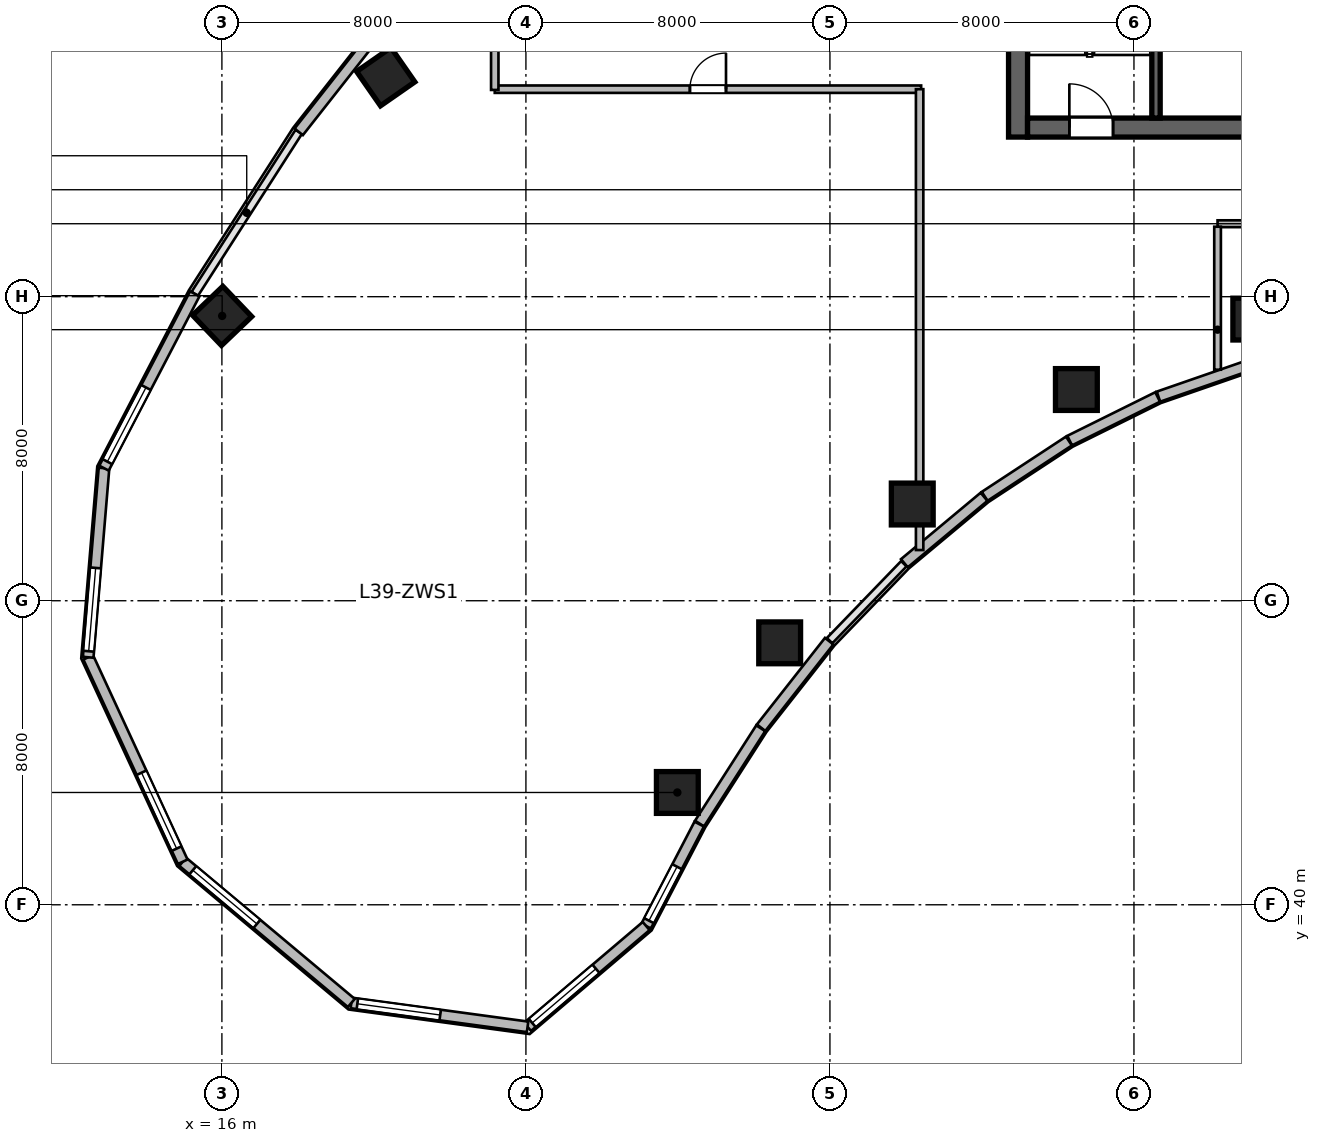
"""IFC4 building model, lengths in metres.
Left out: names, types, materials, properties, quantities, classifications, styles, units other than length and angle.
Written with IfcOpenShell. Run it as: python <this file> out.ifc"""

import sys

from ifc_helpers import new_model, si_unit, direction, frame, frame_2d, origin, origin_2d, place, context, subcontext, project, spatial, rectangle, circle, extrude, source, transform, mapped, element, fill, save


model = new_model("IFC4")
c1 = context("Model", 3, precision=1e-05, world=origin(), true_north=direction((0.0, 1.0)))
c2 = subcontext(c1, "Body", "Model", "MODEL_VIEW")
j1 = project(units=[si_unit("LENGTHUNIT", "METRE"), si_unit("PLANEANGLEUNIT", "RADIAN")], contexts=[c1])
p1 = place(None, origin())
s1 = spatial("IfcSite", under=j1, at=p1, CompositionType="ELEMENT")
p2 = place(p1, origin())
s2 = spatial("IfcBuilding", under=s1, at=p2, CompositionType="ELEMENT")
p3 = place(p2, frame((0.0, 0.0, 162.3)))
s3 = spatial("IfcBuildingStorey", under=s2, at=p3, CompositionType="ELEMENT", Elevation=162.3)
m1 = source(origin(), c2, "Body", "SweptSolid", [
    extrude(rectangle(XDim=12.0, YDim=0.5, at=frame_2d((6.0, 0.0))), origin(), (0.0, 0.0, 1.0), 3.9),
])
p4 = place(p3, frame((36.95, 60.2, 0.0), z_axis=(0.0, 0.0, 1.0), x_axis=(0.0, 1.0, 0.0)))
e1 = element("IfcWall", 1, at=p4, inside=s3, PredefinedType="SHEAR", context=c2, shape_type="MappedRepresentation", body=[
    mapped(m1, transform((0.0, 0.0, 0.0), scale=1.0)),
])
m2 = source(origin(), c2, "Body", "SweptSolid", [
    extrude(rectangle(XDim=21.6, YDim=0.5, at=frame_2d((10.8, 0.0))), origin(), (0.0, 0.0, 1.0), 3.9),
])
p5 = place(p3, frame((37.2, 60.45, 0.0), z_axis=(0.0, 0.0, 1.0), x_axis=(1.0, 0.0, 0.0)))
e2 = element("IfcWall", 2, at=p5, inside=s3, PredefinedType="SHEAR", context=c2, shape_type="MappedRepresentation", body=[
    mapped(m2, transform((0.0, 0.0, 0.0), scale=1.0)),
])
p6 = place(p5, frame((1.1, 0.0, 0.0)))
e3 = element("IfcOpeningElement", 3, at=p6, cuts=e2, PredefinedType="OPENING", context=c2, shape_type="SweptSolid", body=[
    extrude(rectangle(XDim=1.15, YDim=2.15, at=frame_2d((0.575, 1.075))), frame((0.0, 0.26, 0.0), z_axis=(0.0, -1.0, 0.0), x_axis=(1.0, 0.0, 0.0)), (0.0, 0.0, 1.0), 0.52),
])
p7 = place(p5, frame((19.5, 0.0, 0.0)))
e4 = element("IfcOpeningElement", 4, at=p7, cuts=e2, PredefinedType="OPENING", context=c2, shape_type="SweptSolid", body=[
    extrude(rectangle(XDim=0.9, YDim=2.1, at=frame_2d((0.45, 1.05))), frame((0.0, 0.26, 0.0), z_axis=(0.0, -1.0, 0.0), x_axis=(1.0, 0.0, 0.0)), (0.0, 0.0, 1.0), 0.52),
])
p8 = place(p5, frame((12.02, 0.0, 0.0)))
e5 = element("IfcOpeningElement", 5, at=p8, cuts=e2, PredefinedType="OPENING", context=c2, shape_type="SweptSolid", body=[
    extrude(rectangle(XDim=1.6, YDim=2.15, at=frame_2d((0.8, 1.075))), frame((0.0, 0.26, 0.0), z_axis=(0.0, -1.0, 0.0), x_axis=(1.0, 0.0, 0.0)), (0.0, 0.0, 1.0), 0.52),
])
m3 = source(origin(), c2, "Body", "SweptSolid", [
    extrude(rectangle(XDim=11.0, YDim=0.22, at=frame_2d((5.5, 0.0))), origin(), (0.0, 0.0, 1.0), 3.9),
])
p9 = place(p3, frame((40.58, 60.7, 0.0), z_axis=(0.0, 0.0, 1.0), x_axis=(0.0, 1.0, 0.0)))
e6 = element("IfcWall", 6, at=p9, inside=s3, PredefinedType="SHEAR", context=c2, shape_type="MappedRepresentation", body=[
    mapped(m3, transform((0.0, 0.0, 0.0), scale=1.0)),
])
m4 = source(origin(), c2, "Body", "SweptSolid", [
    extrude(circle(Radius=0.55, at=origin_2d()), origin(), (0.0, 0.0, 1.0), 3.9),
])
p10 = place(p3, frame((27.985, 42.955, 0.0), z_axis=(0.0, 0.0, 1.0), x_axis=(-0.690756218984, 0.723087716626, 0.0)))
e7 = element("IfcColumn", 7, at=p10, inside=s3, PredefinedType="COLUMN", context=c2, shape_type="MappedRepresentation", body=[
    mapped(m4, transform((0.0, 0.0, 0.0), scale=1.0)),
])
m5 = source(origin(), c2, "Body", "SweptSolid", [
    extrude(rectangle(XDim=1.1, YDim=1.1, at=origin_2d()), origin(), (0.0, 0.0, 1.0), 3.9),
])
p11 = place(p3, frame((16.007, 55.494, 0.0), z_axis=(0.0, 0.0, 1.0), x_axis=(-0.690756218984, 0.723087716626, 0.0)))
e8 = element("IfcColumn", 8, at=p11, inside=s3, PredefinedType="COLUMN", context=c2, shape_type="MappedRepresentation", body=[
    mapped(m5, transform((0.0, 0.0, 0.0), scale=1.0)),
])
p12 = place(p3, frame((30.677, 46.892, 0.0), z_axis=(0.0, 0.0, 1.0), x_axis=(-0.571143442153, 0.820850271661, 0.0)))
e9 = element("IfcColumn", 9, at=p12, inside=s3, PredefinedType="COLUMN", context=c2, shape_type="MappedRepresentation", body=[
    mapped(m4, transform((0.0, 0.0, 0.0), scale=1.0)),
])
p13 = place(p3, frame((20.311, 61.789, 0.0), z_axis=(0.0, 0.0, 1.0), x_axis=(-0.571143442153, 0.820850271661, 0.0)))
e10 = element("IfcColumn", 10, at=p13, inside=s3, PredefinedType="COLUMN", context=c2, shape_type="MappedRepresentation", body=[
    mapped(m5, transform((0.0, 0.0, 0.0), scale=1.0)),
])
for number, where, z_axis, x_axis in (
    (11, (34.166, 50.545, 0.0), (0.0, 0.0, 1.0), (-0.436, 0.9, 0.0)),
    (12, (38.485, 53.558, 0.0), (0.0, 0.0, 1.0), (-0.289, 0.957, 0.0)),
    (13, (43.154, 55.411, 0.0), (0.0, 0.0, 1.0), (-0.143, 0.99, 0.0)),
):
    element("IfcColumn", number, at=place(p3, frame(where, z_axis=z_axis, x_axis=x_axis)), inside=s3, PredefinedType="COLUMN", context=c2, shape_type="MappedRepresentation", body=[
        mapped(m4, transform((0.0, 0.0, 0.0), scale=1.0)),
    ])
m6 = source(origin(), c2, "Body", "SweptSolid", [
    extrude(rectangle(XDim=2.53, YDim=0.28, at=frame_2d((1.265, 0.0))), origin(), (0.0, 0.0, 1.0), 3.65),
])
p14 = place(p3, frame((43.035, 54.198, 0.0), z_axis=(0.0, 0.0, 1.0), x_axis=(-0.944872429646, -0.327438683872, 0.0)))
e14 = element("IfcWall", 14, at=p14, inside=s3, PredefinedType="SOLIDWALL", context=c2, shape_type="MappedRepresentation", body=[
    mapped(m6, transform((0.0, 0.0, 0.0), scale=1.0)),
])
m7 = source(origin(), c2, "Body", "SweptSolid", [
    extrude(rectangle(XDim=2.584, YDim=0.28, at=frame_2d((1.292, 0.0))), origin(), (0.0, 0.0, 1.0), 3.65),
])
p15 = place(p3, frame((40.624, 53.361, 0.0), z_axis=(0.0, 0.0, 1.0), x_axis=(-0.895989792847, -0.44407464588, 0.0)))
e15 = element("IfcWall", 15, at=p15, inside=s3, PredefinedType="SOLIDWALL", context=c2, shape_type="MappedRepresentation", body=[
    mapped(m7, transform((0.0, 0.0, 0.0), scale=1.0)),
])
m8 = source(origin(), c2, "Body", "SweptSolid", [
    extrude(rectangle(XDim=2.652, YDim=0.28, at=frame_2d((1.326, 0.0))), origin(), (0.0, 0.0, 1.0), 3.65),
])
p16 = place(p3, frame((38.289, 52.202, 0.0), z_axis=(0.0, 0.0, 1.0), x_axis=(-0.836008323535, -0.54871676025, 0.0)))
e16 = element("IfcWall", 16, at=p16, inside=s3, PredefinedType="SOLIDWALL", context=c2, shape_type="MappedRepresentation", body=[
    mapped(m8, transform((0.0, 0.0, 0.0), scale=1.0)),
])
m9 = source(origin(), c2, "Body", "SweptSolid", [
    extrude(rectangle(XDim=2.729, YDim=0.28, at=frame_2d((1.365, 0.0))), origin(), (0.0, 0.0, 1.0), 3.65),
])
p17 = place(p3, frame((36.055, 50.735, 0.0), z_axis=(0.0, 0.0, 1.0), x_axis=(-0.767957284255, -0.640501061326, 0.0)))
e17 = element("IfcWall", 17, at=p17, inside=s3, PredefinedType="SOLIDWALL", context=c2, shape_type="MappedRepresentation", body=[
    mapped(m9, transform((0.0, 0.0, 0.0), scale=1.0)),
])
m10 = source(origin(), c2, "Body", "SweptSolid", [
    extrude(rectangle(XDim=2.897, YDim=0.28, at=frame_2d((1.448, 0.0))), origin(), (0.0, 0.0, 1.0), 3.65),
])
p18 = place(p3, frame((31.979, 46.936, 0.0), z_axis=(0.0, 0.0, 1.0), x_axis=(-0.618167636915, -0.786046291685, 0.0)))
e18 = element("IfcWall", 18, at=p18, inside=s3, PredefinedType="SOLIDWALL", context=c2, shape_type="MappedRepresentation", body=[
    mapped(m10, transform((0.0, 0.0, 0.0), scale=1.0)),
])
m11 = source(origin(), c2, "Body", "SweptSolid", [
    extrude(rectangle(XDim=2.981, YDim=0.28, at=frame_2d((1.49, 0.0))), origin(), (0.0, 0.0, 1.0), 3.65),
])
p19 = place(p3, frame((30.179, 44.645, 0.0), z_axis=(0.0, 0.0, 1.0), x_axis=(-0.540194451908, -0.841540227278, 0.0)))
e19 = element("IfcWall", 19, at=p19, inside=s3, PredefinedType="SOLIDWALL", context=c2, shape_type="MappedRepresentation", body=[
    mapped(m11, transform((0.0, 0.0, 0.0), scale=1.0)),
])
m12 = source(origin(), c2, "Body", "SweptSolid", [
    extrude(rectangle(XDim=3.024, YDim=0.28, at=frame_2d((1.512, 0.0))), origin(), (0.0, 0.0, 1.0), 3.65),
])
p20 = place(p3, frame((28.561, 42.123, 0.0), z_axis=(0.0, 0.0, 1.0), x_axis=(-0.461718746531, -0.887026380161, 0.0)))
e20 = element("IfcWall", 20, at=p20, inside=s3, PredefinedType="SOLIDWALL", context=c2, shape_type="MappedRepresentation", body=[
    mapped(m12, transform((0.0, 0.0, 0.0), scale=1.0)),
])
p21 = place(p20, frame((1.264, 0.0, 0.95)))
e21 = element("IfcOpeningElement", 21, at=p21, cuts=e20, PredefinedType="OPENING", context=c2, shape_type="SweptSolid", body=[
    extrude(rectangle(XDim=1.6, YDim=1.9, at=frame_2d((0.8, 0.95))), frame((0.0, 0.15, 0.0), z_axis=(0.0, -1.0, 0.0), x_axis=(1.0, 0.0, 0.0)), (0.0, 0.0, 1.0), 0.3),
])
m13 = source(origin(), c2, "Body", "SweptSolid", [
    extrude(rectangle(XDim=4.096, YDim=0.28, at=frame_2d((2.048, 0.0))), origin(), (0.0, 0.0, 1.0), 3.65),
])
p22 = place(p3, frame((27.164, 39.44, 0.0), z_axis=(0.0, 0.0, 1.0), x_axis=(-0.761926081737, -0.647663991564, 0.0)))
e22 = element("IfcWall", 22, at=p22, inside=s3, PredefinedType="SOLIDWALL", context=c2, shape_type="MappedRepresentation", body=[
    mapped(m13, transform((0.0, 0.0, 0.0), scale=1.0)),
])
p23 = place(p22, frame((1.736, 0.0, 0.95)))
e23 = element("IfcOpeningElement", 23, at=p23, cuts=e22, PredefinedType="OPENING", context=c2, shape_type="SweptSolid", body=[
    extrude(rectangle(XDim=2.2, YDim=2.1, at=frame_2d((1.1, 1.05))), frame((0.0, 0.15, 0.0), z_axis=(0.0, -1.0, 0.0), x_axis=(1.0, 0.0, 0.0)), (0.0, 0.0, 1.0), 0.3),
])
m14 = source(origin(), c2, "Body", "SweptSolid", [
    extrude(rectangle(XDim=4.68, YDim=0.28, at=frame_2d((2.34, 0.0))), origin(), (0.0, 0.0, 1.0), 3.65),
])
p24 = place(p3, frame((24.043, 36.788, 0.0), z_axis=(0.0, 0.0, 1.0), x_axis=(-0.990931146435, 0.134370618162, 0.0)))
e24 = element("IfcWall", 24, at=p24, inside=s3, PredefinedType="SOLIDWALL", context=c2, shape_type="MappedRepresentation", body=[
    mapped(m14, transform((0.0, 0.0, 0.0), scale=1.0)),
])
p25 = place(p24, frame((2.32, 0.0, 0.95)))
e25 = element("IfcOpeningElement", 25, at=p25, cuts=e24, PredefinedType="OPENING", context=c2, shape_type="SweptSolid", body=[
    extrude(rectangle(XDim=2.2, YDim=2.1, at=frame_2d((1.1, 1.05))), frame((0.0, 0.15, 0.0), z_axis=(0.0, -1.0, 0.0), x_axis=(1.0, 0.0, 0.0)), (0.0, 0.0, 1.0), 0.3),
])
m15 = source(origin(), c2, "Body", "SweptSolid", [
    extrude(rectangle(XDim=5.786, YDim=0.28, at=frame_2d((2.893, 0.0))), origin(), (0.0, 0.0, 1.0), 3.65),
])
p26 = place(p3, frame((19.406, 37.417, 0.0), z_axis=(0.0, 0.0, 1.0), x_axis=(-0.766711306852, 0.641992034176, 0.0)))
e26 = element("IfcWall", 26, at=p26, inside=s3, PredefinedType="SOLIDWALL", context=c2, shape_type="MappedRepresentation", body=[
    mapped(m15, transform((0.0, 0.0, 0.0), scale=1.0)),
])
p27 = place(p26, frame((3.24, 0.0, 0.95)))
e27 = element("IfcOpeningElement", 27, at=p27, cuts=e26, PredefinedType="OPENING", context=c2, shape_type="SweptSolid", body=[
    extrude(rectangle(XDim=2.2, YDim=2.1, at=frame_2d((1.1, 1.05))), frame((0.0, 0.15, 0.0), z_axis=(0.0, -1.0, 0.0), x_axis=(1.0, 0.0, 0.0)), (0.0, 0.0, 1.0), 0.3),
])
m16 = source(origin(), c2, "Body", "SweptSolid", [
    extrude(rectangle(XDim=5.927, YDim=0.28, at=frame_2d((2.964, 0.0))), origin(), (0.0, 0.0, 1.0), 3.65),
])
p28 = place(p3, frame((14.969, 41.131, 0.0), z_axis=(0.0, 0.0, 1.0), x_axis=(-0.419656204795, 0.907683132914, 0.0)))
e28 = element("IfcWall", 28, at=p28, inside=s3, PredefinedType="SOLIDWALL", context=c2, shape_type="MappedRepresentation", body=[
    mapped(m16, transform((0.0, 0.0, 0.0), scale=1.0)),
])
p29 = place(p28, frame((0.382, 0.0, 0.95)))
e29 = element("IfcOpeningElement", 29, at=p29, cuts=e28, PredefinedType="OPENING", context=c2, shape_type="SweptSolid", body=[
    extrude(rectangle(XDim=2.2, YDim=2.1, at=frame_2d((1.1, 1.05))), frame((0.0, 0.15, 0.0), z_axis=(0.0, -1.0, 0.0), x_axis=(1.0, 0.0, 0.0)), (0.0, 0.0, 1.0), 0.3),
])
m17 = source(origin(), c2, "Body", "SweptSolid", [
    extrude(rectangle(XDim=4.994, YDim=0.28, at=frame_2d((2.497, 0.0))), origin(), (0.0, 0.0, 1.0), 3.65),
])
p30 = place(p3, frame((12.481, 46.512, 0.0), z_axis=(0.0, 0.0, 1.0), x_axis=(0.083344839916, 0.996520766296, 0.0)))
e30 = element("IfcWall", 30, at=p30, inside=s3, PredefinedType="SOLIDWALL", context=c2, shape_type="MappedRepresentation", body=[
    mapped(m17, transform((0.0, 0.0, 0.0), scale=1.0)),
])
p31 = place(p30, frame((0.16, 0.0, 0.95)))
e31 = element("IfcOpeningElement", 31, at=p31, cuts=e30, PredefinedType="OPENING", context=c2, shape_type="SweptSolid", body=[
    extrude(rectangle(XDim=2.2, YDim=2.1, at=frame_2d((1.1, 1.05))), frame((0.0, 0.15, 0.0), z_axis=(0.0, -1.0, 0.0), x_axis=(1.0, 0.0, 0.0)), (0.0, 0.0, 1.0), 0.3),
])
m18 = source(origin(), c2, "Body", "SweptSolid", [
    extrude(rectangle(XDim=5.171, YDim=0.28, at=frame_2d((2.585, 0.0))), origin(), (0.0, 0.0, 1.0), 3.65),
])
p32 = place(p3, frame((12.898, 51.489, 0.0), z_axis=(0.0, 0.0, 1.0), x_axis=(0.461752581363, 0.887008767491, 0.0)))
e32 = element("IfcWall", 32, at=p32, inside=s3, PredefinedType="SOLIDWALL", context=c2, shape_type="MappedRepresentation", body=[
    mapped(m18, transform((0.0, 0.0, 0.0), scale=1.0)),
])
p33 = place(p32, frame((0.193, 0.0, 0.95)))
e33 = element("IfcOpeningElement", 33, at=p33, cuts=e32, PredefinedType="OPENING", context=c2, shape_type="SweptSolid", body=[
    extrude(rectangle(XDim=2.2, YDim=2.1, at=frame_2d((1.1, 1.05))), frame((0.0, 0.15, 0.0), z_axis=(0.0, -1.0, 0.0), x_axis=(1.0, 0.0, 0.0)), (0.0, 0.0, 1.0), 0.3),
])
m19 = source(origin(), c2, "Body", "SweptSolid", [
    extrude(rectangle(XDim=4.922, YDim=0.28, at=frame_2d((2.461, 0.0))), origin(), (0.0, 0.0, 1.0), 3.65),
])
p34 = place(p3, frame((18.021, 60.338, 0.0), z_axis=(0.0, 0.0, 1.0), x_axis=(0.61817639101, 0.786039407153, 0.0)))
e34 = element("IfcWall", 34, at=p34, inside=s3, PredefinedType="SOLIDWALL", context=c2, shape_type="MappedRepresentation", body=[
    mapped(m19, transform((0.0, 0.0, 0.0), scale=1.0)),
])
m20 = source(origin(), c2, "Body", "SweptSolid", [
    extrude(rectangle(XDim=4.176, YDim=0.18, at=frame_2d((2.088, 0.0))), origin(), (0.0, 0.0, 1.0), 3.65),
])
p35 = place(p3, frame((42.2, 57.92, 0.0), z_axis=(0.0, 0.0, 1.0), x_axis=(1.0, 0.0, 0.0)))
e35 = element("IfcWall", 35, at=p35, inside=s3, PredefinedType="PLUMBINGWALL", context=c2, shape_type="MappedRepresentation", body=[
    mapped(m20, transform((0.0, 0.0, 0.0), scale=1.0)),
])
p36 = place(p35, frame((1.638, 0.0, 0.0)))
e36 = element("IfcOpeningElement", 36, at=p36, cuts=e35, PredefinedType="OPENING", context=c2, shape_type="SweptSolid", body=[
    extrude(rectangle(XDim=0.9, YDim=2.08, at=frame_2d((0.45, 1.04))), frame((0.0, 0.1, 0.0), z_axis=(0.0, -1.0, 0.0), x_axis=(1.0, 0.0, 0.0)), (0.0, 0.0, 1.0), 0.2),
])
m21 = source(origin(), c2, "Body", "SweptSolid", [
    extrude(rectangle(XDim=3.763, YDim=0.175, at=frame_2d((1.881, 0.0))), origin(), (0.0, 0.0, 1.0), 3.65),
])
p37 = place(p3, frame((42.2, 54.079, 0.0), z_axis=(0.0, 0.0, 1.0), x_axis=(0.0, 1.0, 0.0)))
e37 = element("IfcWall", 37, at=p37, inside=s3, PredefinedType="PARTITIONING", context=c2, shape_type="MappedRepresentation", body=[
    mapped(m21, transform((0.0, 0.0, 0.0), scale=1.0)),
])
m22 = source(origin(), c2, "Body", "SweptSolid", [
    extrude(rectangle(XDim=11.22, YDim=0.195, at=frame_2d((5.61, 0.0))), origin(), (0.0, 0.0, 1.0), 3.65),
])
p38 = place(p3, frame((23.18, 61.46, 0.0), z_axis=(0.0, 0.0, 1.0), x_axis=(1.0, 0.0, 0.0)))
e38 = element("IfcWall", 38, at=p38, inside=s3, PredefinedType="PARTITIONING", context=c2, shape_type="MappedRepresentation", body=[
    mapped(m22, transform((0.0, 0.0, 0.0), scale=1.0)),
])
p39 = place(p38, frame((5.135, 0.0, 0.0)))
e39 = element("IfcOpeningElement", 39, at=p39, cuts=e38, PredefinedType="OPENING", context=c2, shape_type="SweptSolid", body=[
    extrude(rectangle(XDim=0.95, YDim=2.1, at=frame_2d((0.475, 1.05))), frame((0.0, 0.107, 0.0), z_axis=(0.0, -1.0, 0.0), x_axis=(1.0, 0.0, 0.0)), (0.0, 0.0, 1.0), 0.215),
])
m23 = source(origin(), c2, "Body", "SweptSolid", [
    extrude(rectangle(XDim=12.126, YDim=0.195, at=frame_2d((6.063, 0.0))), origin(), (0.0, 0.0, 1.0), 3.65),
])
p40 = place(p3, frame((34.36, 49.334, 0.0), z_axis=(0.0, 0.0, 1.0), x_axis=(0.0, 1.0, 0.0)))
e40 = element("IfcWall", 40, at=p40, inside=s3, PredefinedType="PARTITIONING", context=c2, shape_type="MappedRepresentation", body=[
    mapped(m23, transform((0.0, 0.0, 0.0), scale=1.0)),
])
m24 = source(origin(), c2, "Body", "SweptSolid", [
    extrude(rectangle(XDim=2.62, YDim=0.195, at=frame_2d((1.31, 0.0))), origin(), (0.0, 0.0, 1.0), 3.65),
])
p41 = place(p3, frame((23.18, 61.44, 0.0), z_axis=(0.0, 0.0, 1.0), x_axis=(0.0, 1.0, 0.0)))
e41 = element("IfcWall", 41, at=p41, inside=s3, PredefinedType="PARTITIONING", context=c2, shape_type="MappedRepresentation", body=[
    mapped(m24, transform((0.0, 0.0, 0.0), scale=1.0)),
])
m25 = source(origin(), c2, "Body", "SweptSolid", [
    extrude(rectangle(XDim=1.6, YDim=1.9, at=frame_2d((0.8, 0.95))), frame((0.0, 0.03, 0.0), z_axis=(0.0, -1.0, 0.0), x_axis=(1.0, 0.0, 0.0)), (0.0, 0.0, 1.0), 0.06),
])
p42 = place(p21, origin())
e42 = element("IfcWindow", 42, at=p42, inside=s3, PartitioningType="SINGLE_PANEL", PredefinedType="WINDOW", context=c2, shape_type="MappedRepresentation", body=[
    mapped(m25, transform((0.0, 0.0, 0.0), scale=1.0)),
])
fill(e21, e42)
m26 = source(origin(), c2, "Body", "SweptSolid", [
    extrude(rectangle(XDim=2.2, YDim=2.1, at=frame_2d((1.1, 1.05))), frame((0.0, 0.03, 0.0), z_axis=(0.0, -1.0, 0.0), x_axis=(1.0, 0.0, 0.0)), (0.0, 0.0, 1.0), 0.06),
])
p43 = place(p23, origin())
e43 = element("IfcWindow", 43, at=p43, inside=s3, PartitioningType="TRIPLE_PANEL_VERTICAL", PredefinedType="WINDOW", context=c2, shape_type="MappedRepresentation", body=[
    mapped(m26, transform((0.0, 0.0, 0.0), scale=1.0)),
])
fill(e23, e43)
p44 = place(p25, origin())
e44 = element("IfcWindow", 44, at=p44, inside=s3, PartitioningType="TRIPLE_PANEL_VERTICAL", PredefinedType="WINDOW", context=c2, shape_type="MappedRepresentation", body=[
    mapped(m26, transform((0.0, 0.0, 0.0), scale=1.0)),
])
fill(e25, e44)
p45 = place(p27, origin())
e45 = element("IfcWindow", 45, at=p45, inside=s3, PartitioningType="TRIPLE_PANEL_VERTICAL", PredefinedType="WINDOW", context=c2, shape_type="MappedRepresentation", body=[
    mapped(m26, transform((0.0, 0.0, 0.0), scale=1.0)),
])
fill(e27, e45)
p46 = place(p29, origin())
e46 = element("IfcWindow", 46, at=p46, inside=s3, PartitioningType="TRIPLE_PANEL_VERTICAL", PredefinedType="WINDOW", context=c2, shape_type="MappedRepresentation", body=[
    mapped(m26, transform((0.0, 0.0, 0.0), scale=1.0)),
])
fill(e29, e46)
p47 = place(p31, origin())
e47 = element("IfcWindow", 47, at=p47, inside=s3, PartitioningType="TRIPLE_PANEL_VERTICAL", PredefinedType="WINDOW", context=c2, shape_type="MappedRepresentation", body=[
    mapped(m26, transform((0.0, 0.0, 0.0), scale=1.0)),
])
fill(e31, e47)
p48 = place(p33, origin())
e48 = element("IfcWindow", 48, at=p48, inside=s3, PartitioningType="TRIPLE_PANEL_VERTICAL", PredefinedType="WINDOW", context=c2, shape_type="MappedRepresentation", body=[
    mapped(m26, transform((0.0, 0.0, 0.0), scale=1.0)),
])
fill(e33, e48)
m27 = source(origin(), c2, "Body", "SweptSolid", [
    extrude(rectangle(XDim=1.15, YDim=2.15, at=frame_2d((0.575, 1.075))), frame((0.0, 0.025, 0.0), z_axis=(0.0, -1.0, 0.0), x_axis=(1.0, 0.0, 0.0)), (0.0, 0.0, 1.0), 0.05),
])
p49 = place(p6, origin())
e49 = element("IfcDoor", 49, at=p49, inside=s3, OperationType="SINGLE_SWING_LEFT", PredefinedType="DOOR", context=c2, shape_type="MappedRepresentation", body=[
    mapped(m27, transform((0.0, 0.0, 0.0), scale=1.0)),
])
fill(e3, e49)
m28 = source(origin(), c2, "Body", "SweptSolid", [
    extrude(rectangle(XDim=0.95, YDim=2.1, at=frame_2d((0.475, 1.05))), frame((0.0, 0.025, 0.0), z_axis=(0.0, -1.0, 0.0), x_axis=(1.0, 0.0, 0.0)), (0.0, 0.0, 1.0), 0.05),
])
p50 = place(p39, origin())
e50 = element("IfcDoor", 50, at=p50, inside=s3, OperationType="SINGLE_SWING_RIGHT", PredefinedType="DOOR", context=c2, shape_type="MappedRepresentation", body=[
    mapped(m28, transform((0.0, 0.0, 0.0), scale=1.0)),
])
fill(e39, e50)
save(model, sys.argv[1])
